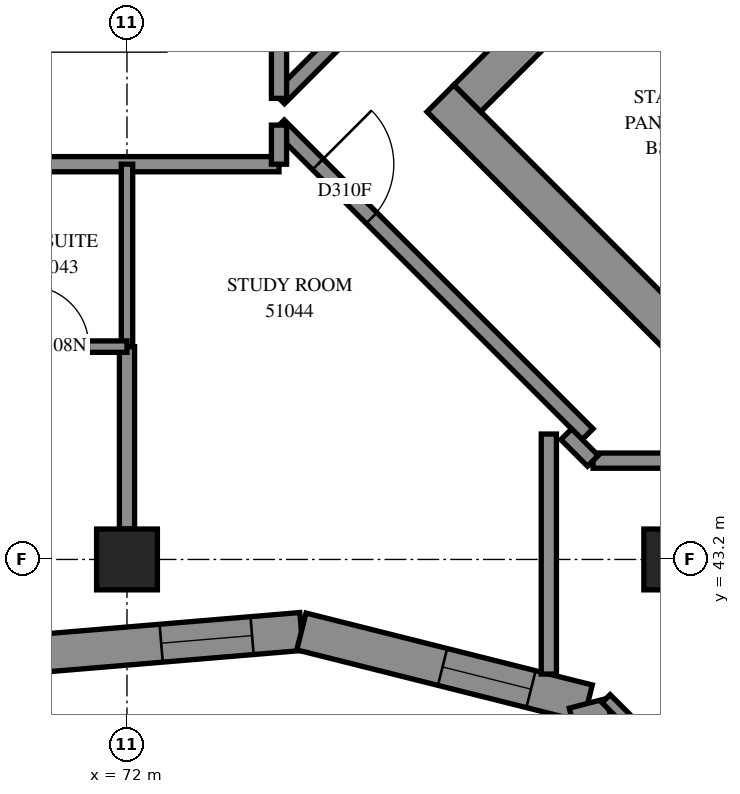
"""IFC4 building model, lengths in metres.
Left out: names, types, materials, properties, quantities, classifications, styles, units other than length and angle.
Written with IfcOpenShell. Run it as: python <this file> out.ifc"""

import sys

from ifc_helpers import new_model, si_unit, direction, frame, frame_2d, origin, origin_2d, place, context, subcontext, project, spatial, polyline, rectangle, outline, extrude, element, fill, save


model = new_model("IFC4")
c1 = context("Model", 3, precision=1e-05, world=origin(), true_north=direction((0.0, 1.0)))
c2 = subcontext(c1, "Body", "Model", "MODEL_VIEW")
j1 = project(units=[si_unit("LENGTHUNIT", "METRE"), si_unit("PLANEANGLEUNIT", "RADIAN")], contexts=[c1])
p1 = place(None, origin())
s1 = spatial("IfcSite", under=j1, at=p1, CompositionType="ELEMENT")
p2 = place(p1, origin())
s2 = spatial("IfcBuilding", under=s1, at=p2, CompositionType="ELEMENT")
p3 = place(p2, frame((0.0, 0.0, 189.6)))
s3 = spatial("IfcBuildingStorey", under=s2, at=p3, CompositionType="ELEMENT", Elevation=189.6)
for number, where, z_axis, x_axis in (
    (1, (72.0, 43.2, 0.0), (0.0, 0.0, 1.0), (1.0, 0.0, 0.0)),
    (2, (79.2, 43.2, 0.0), (0.0, 0.0, 1.0), (1.0, 0.0, 0.0)),
):
    element("IfcColumn", number, at=place(p3, frame(where, z_axis=z_axis, x_axis=x_axis)), inside=s3, PredefinedType="COLUMN", context=c2, shape_type="SweptSolid", body=[
        extrude(rectangle(XDim=0.8, YDim=0.8, at=origin_2d()), origin(), (0.0, 0.0, 1.0), 3.1),
    ])
p4 = place(p3, frame((76.124, 49.267, -0.3), z_axis=(0.0, 0.0, 1.0), x_axis=(0.7071067812, -0.7071067812, 0.0)))
e3 = element("IfcWall", 3, at=p4, inside=s3, PredefinedType="SHEAR", context=c2, shape_type="SweptSolid", body=[
    extrude(rectangle(XDim=15.4, YDim=0.5, at=frame_2d((7.7, 0.0))), origin(), (0.0, 0.0, 1.0), 2.7),
])
p5 = place(p3, frame((76.478, 49.267, -0.3), z_axis=(0.0, 0.0, 1.0), x_axis=(0.7071067812, 0.7071067812, 0.0)))
e4 = element("IfcWall", 4, at=p5, inside=s3, PredefinedType="SHEAR", context=c2, shape_type="SweptSolid", body=[
    extrude(rectangle(XDim=14.4, YDim=0.5, at=frame_2d((7.2, 0.0))), origin(), (0.0, 0.0, 1.0), 2.7),
])
p6 = place(p5, frame((4.55, 0.0, 0.3)))
e5 = element("IfcOpeningElement", 5, at=p6, cuts=e4, PredefinedType="OPENING", context=c2, shape_type="SweptSolid", body=[
    extrude(rectangle(XDim=1.1, YDim=2.1, at=frame_2d((0.55, 1.05))), frame((0.0, 0.26, 0.0), z_axis=(0.0, -1.0, 0.0), x_axis=(1.0, 0.0, 0.0)), (0.0, 0.0, 1.0), 0.52),
])
p7 = place(p5, frame((11.35, 0.0, 0.3)))
e6 = element("IfcOpeningElement", 6, at=p7, cuts=e4, PredefinedType="OPENING", context=c2, shape_type="SweptSolid", body=[
    extrude(rectangle(XDim=1.1, YDim=2.1, at=frame_2d((0.55, 1.05))), frame((0.0, 0.26, 0.0), z_axis=(0.0, -1.0, 0.0), x_axis=(1.0, 0.0, 0.0)), (0.0, 0.0, 1.0), 0.52),
])
p8 = place(p3, frame((78.988, 51.423, 0.0), z_axis=(0.0, 0.0, 1.0), x_axis=(0.7071067812, -0.7071067812, 0.0)))
e7 = element("IfcWall", 7, at=p8, inside=s3, PredefinedType="SOLIDWALL", context=c2, shape_type="SweptSolid", body=[
    extrude(rectangle(XDim=14.4, YDim=0.3, at=frame_2d((7.2, 0.0))), origin(), (0.0, 0.0, 1.0), 3.1),
])
p9 = place(p8, frame((1.35, 0.0, 0.0)))
e8 = element("IfcOpeningElement", 8, at=p9, cuts=e7, PredefinedType="OPENING", context=c2, shape_type="SweptSolid", body=[
    extrude(rectangle(XDim=0.9, YDim=2.1, at=frame_2d((0.45, 1.05))), frame((0.0, 0.16, 0.0), z_axis=(0.0, -1.0, 0.0), x_axis=(1.0, 0.0, 0.0)), (0.0, 0.0, 1.0), 0.32),
])
p10 = place(p8, frame((4.95, 0.0, 0.0)))
e9 = element("IfcOpeningElement", 9, at=p10, cuts=e7, PredefinedType="OPENING", context=c2, shape_type="SweptSolid", body=[
    extrude(rectangle(XDim=0.9, YDim=2.1, at=frame_2d((0.45, 1.05))), frame((0.0, 0.16, 0.0), z_axis=(0.0, -1.0, 0.0), x_axis=(1.0, 0.0, 0.0)), (0.0, 0.0, 1.0), 0.32),
])
p11 = place(p8, frame((8.55, 0.0, 0.0)))
e10 = element("IfcOpeningElement", 10, at=p11, cuts=e7, PredefinedType="OPENING", context=c2, shape_type="SweptSolid", body=[
    extrude(rectangle(XDim=0.9, YDim=2.1, at=frame_2d((0.45, 1.05))), frame((0.0, 0.16, 0.0), z_axis=(0.0, -1.0, 0.0), x_axis=(1.0, 0.0, 0.0)), (0.0, 0.0, 1.0), 0.32),
])
p12 = place(p8, frame((12.05, 0.0, 0.0)))
e11 = element("IfcOpeningElement", 11, at=p12, cuts=e7, PredefinedType="OPENING", context=c2, shape_type="SweptSolid", body=[
    extrude(rectangle(XDim=1.1, YDim=2.1, at=frame_2d((0.55, 1.05))), frame((0.0, 0.16, 0.0), z_axis=(0.0, -1.0, 0.0), x_axis=(1.0, 0.0, 0.0)), (0.0, 0.0, 1.0), 0.32),
])
p13 = place(p3, frame((70.692, 41.951, 0.0), z_axis=(0.0, 0.0, 1.0), x_axis=(0.9965117188, 0.0834529466, 0.0)))
e12 = element("IfcWall", 12, at=p13, inside=s3, PredefinedType="SOLIDWALL", context=c2, shape_type="SweptSolid", body=[
    extrude(outline(polyline([(-0.021, -0.25), (3.574, -0.25), (3.657, 0.25), (0.021, 0.25), (-0.021, -0.25)])), origin(), (0.0, 0.0, 1.0), 3.1),
])
p14 = place(p13, frame((1.764, 0.0, 0.45)))
e13 = element("IfcOpeningElement", 13, at=p14, cuts=e12, PredefinedType="OPENING", context=c2, shape_type="SweptSolid", body=[
    extrude(rectangle(XDim=1.2, YDim=2.5, at=frame_2d((0.6, 1.25))), frame((0.0, 0.26, 0.0), z_axis=(0.0, -1.0, 0.0), x_axis=(1.0, 0.0, 0.0)), (0.0, 0.0, 1.0), 0.52),
])
p15 = place(p3, frame((74.294, 42.253, 0.0), z_axis=(0.0, 0.0, 1.0), x_axis=(0.969855535, -0.243680613, 0.0)))
e14 = element("IfcWall", 14, at=p15, inside=s3, PredefinedType="SOLIDWALL", context=c2, shape_type="SweptSolid", body=[
    extrude(outline(polyline([(0.042, -0.25), (3.735, -0.25), (4.032, 0.25), (-0.042, 0.25), (0.042, -0.25)])), origin(), (0.0, 0.0, 1.0), 3.1),
])
p16 = place(p15, frame((1.915, 0.0, 0.45)))
e15 = element("IfcOpeningElement", 15, at=p16, cuts=e14, PredefinedType="OPENING", context=c2, shape_type="SweptSolid", body=[
    extrude(rectangle(XDim=1.2, YDim=2.5, at=frame_2d((0.6, 1.25))), frame((0.0, 0.26, 0.0), z_axis=(0.0, -1.0, 0.0), x_axis=(1.0, 0.0, 0.0)), (0.0, 0.0, 1.0), 0.52),
])
p17 = place(p3, frame((78.061, 41.306, 0.0), z_axis=(0.0, 0.0, 1.0), x_axis=(0.2504653843, -0.9681255555, 0.0)))
e16 = element("IfcWall", 16, at=p17, inside=s3, PredefinedType="SOLIDWALL", context=c2, shape_type="SweptSolid", body=[
    extrude(outline(polyline([(0.148, -0.25), (4.878, -0.25), (4.596, 0.25), (-0.148, 0.25), (0.148, -0.25)])), origin(), (0.0, 0.0, 1.0), 3.1),
])
p18 = place(p17, frame((2.229, 0.0, 0.45)))
e17 = element("IfcOpeningElement", 17, at=p18, cuts=e16, PredefinedType="OPENING", context=c2, shape_type="SweptSolid", body=[
    extrude(rectangle(XDim=1.2, YDim=2.5, at=frame_2d((0.6, 1.25))), frame((0.0, 0.26, 0.0), z_axis=(0.0, -1.0, 0.0), x_axis=(1.0, 0.0, 0.0)), (0.0, 0.0, 1.0), 0.52),
])
p19 = place(p17, frame((0.356, 0.0, 0.45)))
e18 = element("IfcOpeningElement", 18, at=p19, cuts=e16, PredefinedType="OPENING", context=c2, shape_type="SweptSolid", body=[
    extrude(rectangle(XDim=0.8, YDim=2.5, at=frame_2d((0.4, 1.25))), frame((0.0, 0.26, 0.0), z_axis=(0.0, -1.0, 0.0), x_axis=(1.0, 0.0, 0.0)), (0.0, 0.0, 1.0), 0.52),
])
p20 = place(p3, frame((55.6, 48.4, 0.0), z_axis=(0.0, 0.0, 1.0), x_axis=(1.0, 0.0, 0.0)))
e19 = element("IfcWall", 19, at=p20, inside=s3, PredefinedType="PARTITIONING", context=c2, shape_type="SweptSolid", body=[
    extrude(rectangle(XDim=18.4, YDim=0.2, at=frame_2d((9.2, 0.0))), origin(), (0.0, 0.0, 1.0), 3.1),
])
p21 = place(p20, frame((5.862, 0.0, 0.0)))
e20 = element("IfcOpeningElement", 20, at=p21, cuts=e19, PredefinedType="OPENING", context=c2, shape_type="SweptSolid", body=[
    extrude(rectangle(XDim=1.0, YDim=2.1, at=frame_2d((0.5, 1.05))), frame((0.0, 0.11, 0.0), z_axis=(0.0, -1.0, 0.0), x_axis=(1.0, 0.0, 0.0)), (0.0, 0.0, 1.0), 0.22),
])
p22 = place(p20, frame((11.5, 0.0, 0.0)))
e21 = element("IfcOpeningElement", 21, at=p22, cuts=e19, PredefinedType="OPENING", context=c2, shape_type="SweptSolid", body=[
    extrude(rectangle(XDim=0.9, YDim=2.1, at=frame_2d((0.45, 1.05))), frame((0.0, 0.11, 0.0), z_axis=(0.0, -1.0, 0.0), x_axis=(1.0, 0.0, 0.0)), (0.0, 0.0, 1.0), 0.22),
])
p23 = place(p20, frame((13.2, 0.0, 0.0)))
e22 = element("IfcOpeningElement", 22, at=p23, cuts=e19, PredefinedType="OPENING", context=c2, shape_type="SweptSolid", body=[
    extrude(rectangle(XDim=0.9, YDim=2.1, at=frame_2d((0.45, 1.05))), frame((0.0, 0.11, 0.0), z_axis=(0.0, -1.0, 0.0), x_axis=(1.0, 0.0, 0.0)), (0.0, 0.0, 1.0), 0.22),
])
p24 = place(p3, frame((73.999, 48.911, 0.0), z_axis=(0.0, 0.0, 1.0), x_axis=(0.7071067812, -0.7071067812, 0.0)))
e23 = element("IfcWall", 23, at=p24, inside=s3, PredefinedType="PARTITIONING", context=c2, shape_type="SweptSolid", body=[
    extrude(rectangle(XDim=5.745, YDim=0.2, at=frame_2d((2.872, 0.0))), origin(), (0.0, 0.0, 1.0), 3.1),
])
p25 = place(p24, frame((0.724, 0.0, 0.0)))
e24 = element("IfcOpeningElement", 24, at=p25, cuts=e23, PredefinedType="OPENING", context=c2, shape_type="SweptSolid", body=[
    extrude(rectangle(XDim=1.0, YDim=2.1, at=frame_2d((0.5, 1.05))), frame((0.0, 0.11, 0.0), z_axis=(0.0, -1.0, 0.0), x_axis=(1.0, 0.0, 0.0)), (0.0, 0.0, 1.0), 0.22),
])
p26 = place(p3, frame((74.001, 49.267, 0.0), z_axis=(0.0, 0.0, 1.0), x_axis=(0.7071067812, 0.7071067812, 0.0)))
e25 = element("IfcWall", 25, at=p26, inside=s3, PredefinedType="PARTITIONING", context=c2, shape_type="SweptSolid", body=[
    extrude(rectangle(XDim=5.278, YDim=0.2, at=frame_2d((2.639, 0.0))), origin(), (0.0, 0.0, 1.0), 3.1),
])
p27 = place(p3, frame((74.0, 49.266, 0.0), z_axis=(0.0, 0.0, 1.0), x_axis=(0.0, 1.0, 0.0)))
e26 = element("IfcWall", 26, at=p27, inside=s3, PredefinedType="PARTITIONING", context=c2, shape_type="SweptSolid", body=[
    extrude(rectangle(XDim=3.734, YDim=0.2, at=frame_2d((1.867, 0.0))), origin(), (0.0, 0.0, 1.0), 3.1),
])
p28 = place(p3, frame((77.55, 41.692, 0.0), z_axis=(0.0, 0.0, 1.0), x_axis=(0.0, 1.0, 0.0)))
e27 = element("IfcWall", 27, at=p28, inside=s3, PredefinedType="PARTITIONING", context=c2, shape_type="SweptSolid", body=[
    extrude(rectangle(XDim=3.158, YDim=0.2, at=frame_2d((1.579, 0.0))), origin(), (0.0, 0.0, 1.0), 3.1),
])
p29 = place(p3, frame((78.303, 41.369, 0.0), z_axis=(0.0, 0.0, 1.0), x_axis=(0.706602443, -0.7076107599, 0.0)))
e28 = element("IfcWall", 28, at=p29, inside=s3, PredefinedType="PARTITIONING", context=c2, shape_type="SweptSolid", body=[
    extrude(rectangle(XDim=3.074, YDim=0.15, at=frame_2d((1.537, 0.0))), origin(), (0.0, 0.0, 1.0), 3.1),
])
p30 = place(p3, frame((72.0, 43.6, 0.0), z_axis=(0.0, 0.0, 1.0), x_axis=(0.0, 1.0, 0.0)))
e29 = element("IfcWall", 29, at=p30, inside=s3, PredefinedType="PARTITIONING", context=c2, shape_type="SweptSolid", body=[
    extrude(rectangle(XDim=2.4, YDim=0.2, at=frame_2d((1.2, 0.0))), origin(), (0.0, 0.0, 1.0), 3.1),
])
p31 = place(p3, frame((72.0, 46.0, 0.0), z_axis=(0.0, 0.0, 1.0), x_axis=(0.0, 1.0, 0.0)))
e30 = element("IfcWall", 30, at=p31, inside=s3, PredefinedType="PARTITIONING", context=c2, shape_type="SweptSolid", body=[
    extrude(rectangle(XDim=2.4, YDim=0.15, at=frame_2d((1.2, 0.0))), origin(), (0.0, 0.0, 1.0), 3.1),
])
p32 = place(p3, frame((78.132, 44.5, 0.0), z_axis=(0.0, 0.0, 1.0), x_axis=(1.0, 0.0, 0.0)))
e31 = element("IfcWall", 31, at=p32, inside=s3, PredefinedType="PARTITIONING", context=c2, shape_type="SweptSolid", body=[
    extrude(rectangle(XDim=2.292, YDim=0.2, at=frame_2d((1.146, 0.0))), origin(), (0.0, 0.0, 1.0), 3.1),
])
p33 = place(p3, frame((78.644, 40.05, 0.0), z_axis=(0.0, 0.0, 1.0), x_axis=(0.7070832255, 0.7071303361, 0.0)))
e32 = element("IfcWall", 32, at=p33, inside=s3, PredefinedType="PARTITIONING", context=c2, shape_type="SweptSolid", body=[
    extrude(rectangle(XDim=2.123, YDim=0.15, at=frame_2d((1.061, 0.0))), origin(), (0.0, 0.0, 1.0), 3.1),
])
p34 = place(p3, frame((70.1, 46.0, 0.0), z_axis=(0.0, 0.0, 1.0), x_axis=(1.0, 0.0, 0.0)))
e33 = element("IfcWall", 33, at=p34, inside=s3, PredefinedType="PARTITIONING", context=c2, shape_type="SweptSolid", body=[
    extrude(rectangle(XDim=1.9, YDim=0.15, at=frame_2d((0.95, 0.0))), origin(), (0.0, 0.0, 1.0), 3.1),
])
p35 = place(p34, frame((0.598, 0.0, 0.0)))
e34 = element("IfcOpeningElement", 34, at=p35, cuts=e33, PredefinedType="OPENING", context=c2, shape_type="SweptSolid", body=[
    extrude(rectangle(XDim=0.8, YDim=2.1, at=frame_2d((0.4, 1.05))), frame((0.0, 0.085, 0.0), z_axis=(0.0, -1.0, 0.0), x_axis=(1.0, 0.0, 0.0)), (0.0, 0.0, 1.0), 0.17),
])
p36 = place(p3, frame((74.0, 48.4, 0.0), z_axis=(0.0, 0.0, 1.0), x_axis=(0.0, 1.0, 0.0)))
e35 = element("IfcWall", 35, at=p36, inside=s3, PredefinedType="PARTITIONING", context=c2, shape_type="SweptSolid", body=[
    extrude(rectangle(XDim=0.514, YDim=0.2, at=frame_2d((0.257, 0.0))), origin(), (0.0, 0.0, 1.0), 3.1),
])
p37 = place(p3, frame((77.779, 44.847, 0.0), z_axis=(0.0, 0.0, 1.0), x_axis=(0.7071067812, -0.7071067812, 0.0)))
e36 = element("IfcWall", 36, at=p37, inside=s3, PredefinedType="PARTITIONING", context=c2, shape_type="SweptSolid", body=[
    extrude(rectangle(XDim=0.495, YDim=0.2, at=frame_2d((0.247, 0.0))), origin(), (0.0, 0.0, 1.0), 3.1),
])
p38 = place(p14, origin())
e37 = element("IfcWindow", 37, at=p38, inside=s3, PartitioningType="SINGLE_PANEL", PredefinedType="WINDOW", context=c2, shape_type="SweptSolid", body=[
    extrude(rectangle(XDim=1.2, YDim=2.5, at=frame_2d((0.6, 1.25))), frame((0.0, 0.18, 0.0), z_axis=(0.0, -1.0, 0.0), x_axis=(1.0, 0.0, 0.0)), (0.0, 0.0, 1.0), 0.06),
])
fill(e13, e37)
p39 = place(p16, origin())
e38 = element("IfcWindow", 38, at=p39, inside=s3, PartitioningType="SINGLE_PANEL", PredefinedType="WINDOW", context=c2, shape_type="SweptSolid", body=[
    extrude(rectangle(XDim=1.2, YDim=2.5, at=frame_2d((0.6, 1.25))), frame((0.0, 0.18, 0.0), z_axis=(0.0, -1.0, 0.0), x_axis=(1.0, 0.0, 0.0)), (0.0, 0.0, 1.0), 0.06),
])
fill(e15, e38)
p40 = place(p35, origin())
e39 = element("IfcDoor", 39, at=p40, inside=s3, OperationType="SINGLE_SWING_RIGHT", PredefinedType="DOOR", context=c2, shape_type="SweptSolid", body=[
    extrude(rectangle(XDim=0.8, YDim=2.1, at=frame_2d((0.4, 1.05))), frame((0.0, 0.025, 0.0), z_axis=(0.0, -1.0, 0.0), x_axis=(1.0, 0.0, 0.0)), (0.0, 0.0, 1.0), 0.05),
])
fill(e34, e39)
p41 = place(p25, origin())
e40 = element("IfcDoor", 40, at=p41, inside=s3, OperationType="SINGLE_SWING_LEFT", PredefinedType="DOOR", context=c2, shape_type="SweptSolid", body=[
    extrude(rectangle(XDim=1.0, YDim=2.1, at=frame_2d((0.5, 1.05))), frame((0.0, 0.025, 0.0), z_axis=(0.0, -1.0, 0.0), x_axis=(1.0, 0.0, 0.0)), (0.0, 0.0, 1.0), 0.05),
])
fill(e24, e40)
save(model, sys.argv[1])
